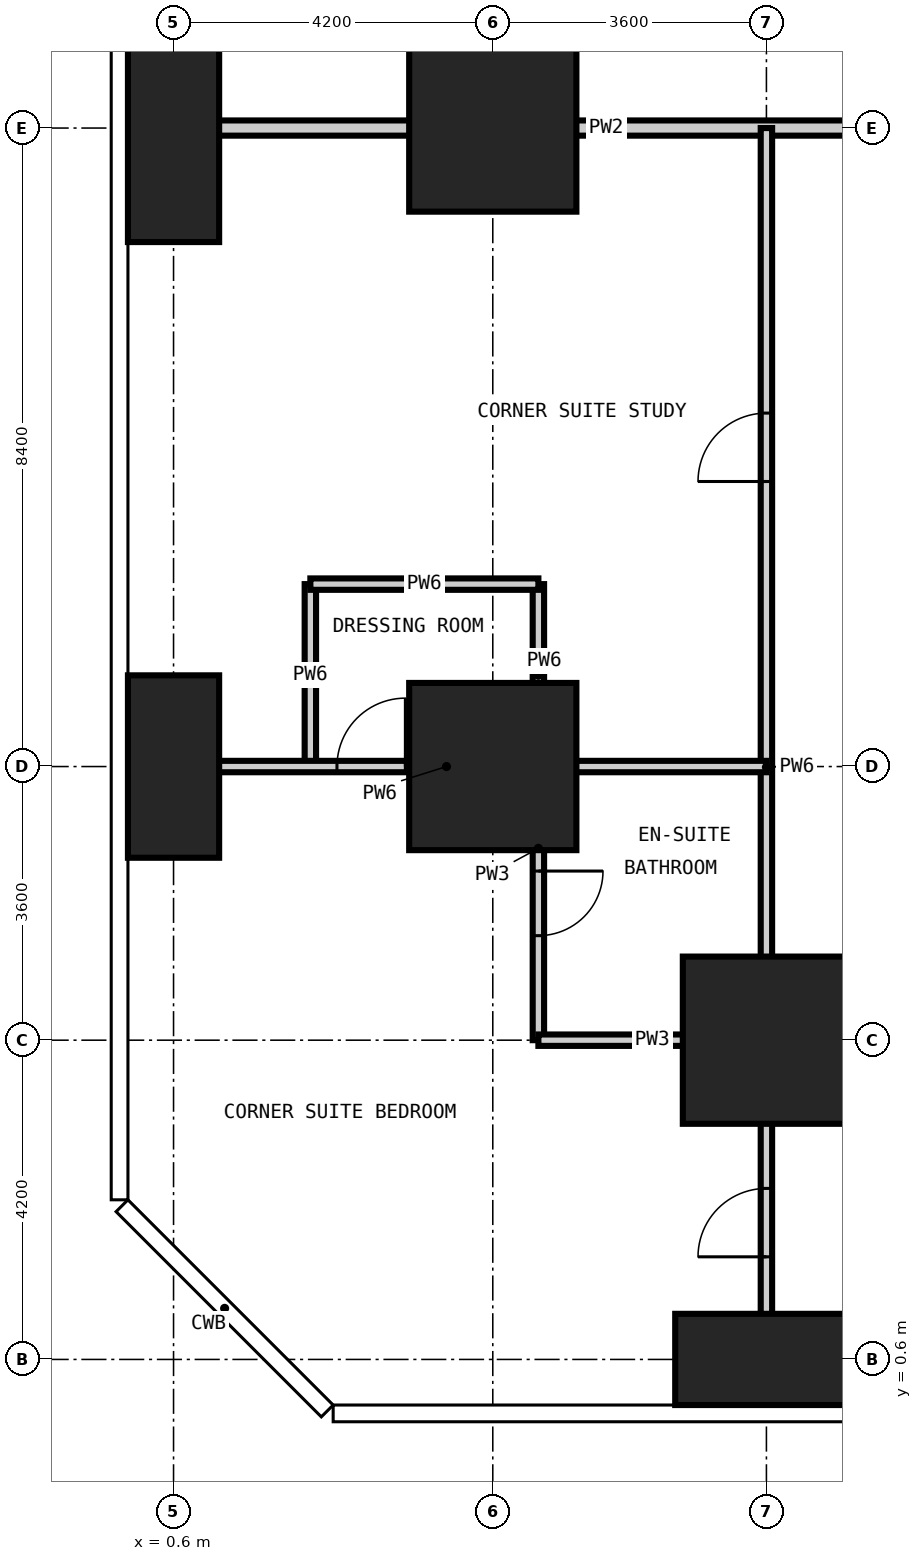
"""IFC4 building model, lengths in metres.
Left out: names, types, materials, properties, quantities, classifications, styles, units other than length and angle.
Written with IfcOpenShell. Run it as: python <this file> out.ifc"""

import sys

from ifc_helpers import new_model, si_unit, direction, frame, frame_2d, origin, origin_2d, place, context, subcontext, project, spatial, rectangle, extrude, element, fill, save


model = new_model("IFC4")
c1 = context("Model", 3, precision=1e-05, world=origin(), true_north=direction((0.0, 1.0)))
c2 = subcontext(c1, "Body", "Model", "MODEL_VIEW")
j1 = project(units=[si_unit("LENGTHUNIT", "METRE"), si_unit("PLANEANGLEUNIT", "RADIAN")], contexts=[c1])
p1 = place(None, origin())
s1 = spatial("IfcSite", under=j1, at=p1, CompositionType="ELEMENT")
p2 = place(p1, origin())
s2 = spatial("IfcBuilding", under=s1, at=p2, CompositionType="ELEMENT")
p3 = place(p2, frame((0.0, 0.0, 93.6)))
s3 = spatial("IfcBuildingStorey", under=s2, at=p3, CompositionType="ELEMENT", Elevation=93.6)
p4 = place(p3, frame((0.6, 8.4, -0.35), z_axis=(0.0, 0.0, 1.0), x_axis=(1.0, 0.0, 0.0)))
e1 = element("IfcColumn", 1, at=p4, inside=s3, PredefinedType="COLUMN", context=c2, shape_type="SweptSolid", body=[
    extrude(rectangle(XDim=1.2, YDim=2.4, at=origin_2d()), origin(), (0.0, 0.0, 1.0), 3.6),
])
p5 = place(p3, frame((0.6, 16.8, -0.35), z_axis=(0.0, 0.0, 1.0), x_axis=(1.0, 0.0, 0.0)))
e2 = element("IfcColumn", 2, at=p5, inside=s3, PredefinedType="COLUMN", context=c2, shape_type="SweptSolid", body=[
    extrude(rectangle(XDim=1.2, YDim=3.0, at=origin_2d()), origin(), (0.0, 0.0, 1.0), 3.6),
])
for number, where, z_axis, x_axis in (
    (3, (4.8, 8.4, -0.35), (0.0, 0.0, 1.0), (1.0, 0.0, 0.0)),
    (4, (4.8, 16.8, -0.35), (0.0, 0.0, 1.0), (1.0, 0.0, 0.0)),
):
    element("IfcColumn", number, at=place(p3, frame(where, z_axis=z_axis, x_axis=x_axis)), inside=s3, PredefinedType="COLUMN", context=c2, shape_type="SweptSolid", body=[
        extrude(rectangle(XDim=2.2, YDim=2.2, at=origin_2d()), origin(), (0.0, 0.0, 1.0), 3.6),
    ])
p6 = place(p3, frame((8.4, 0.6, -0.35), z_axis=(0.0, 0.0, 1.0), x_axis=(1.0, 0.0, 0.0)))
e5 = element("IfcColumn", 5, at=p6, inside=s3, PredefinedType="COLUMN", context=c2, shape_type="SweptSolid", body=[
    extrude(rectangle(XDim=2.4, YDim=1.2, at=origin_2d()), origin(), (0.0, 0.0, 1.0), 3.6),
])
p7 = place(p3, frame((8.4, 4.8, -0.35), z_axis=(0.0, 0.0, 1.0), x_axis=(1.0, 0.0, 0.0)))
e6 = element("IfcColumn", 6, at=p7, inside=s3, PredefinedType="COLUMN", context=c2, shape_type="SweptSolid", body=[
    extrude(rectangle(XDim=2.2, YDim=2.2, at=origin_2d()), origin(), (0.0, 0.0, 1.0), 3.6),
])
p8 = place(p3, frame((5.4, 4.8, 0.0), z_axis=(0.0, 0.0, 1.0), x_axis=(0.0, 1.0, 0.0)))
e7 = element("IfcWall", 7, at=p8, inside=s3, PredefinedType="PARTITIONING", context=c2, shape_type="SweptSolid", body=[
    extrude(rectangle(XDim=3.6, YDim=0.15, at=frame_2d((1.8, 0.0))), origin(), (0.0, 0.0, 1.0), 3.25),
])
p9 = place(p8, frame((1.375, 0.0, 0.0)))
e8 = element("IfcOpeningElement", 8, at=p9, cuts=e7, PredefinedType="OPENING", context=c2, shape_type="SweptSolid", body=[
    extrude(rectangle(XDim=0.85, YDim=2.1, at=frame_2d((0.425, 1.05))), frame((0.0, 0.085, 0.0), z_axis=(0.0, -1.0, 0.0), x_axis=(1.0, 0.0, 0.0)), (0.0, 0.0, 1.0), 0.17),
])
p10 = place(p3, frame((5.4, 4.8, 0.0), z_axis=(0.0, 0.0, 1.0), x_axis=(1.0, 0.0, 0.0)))
e9 = element("IfcWall", 9, at=p10, inside=s3, PredefinedType="PARTITIONING", context=c2, shape_type="SweptSolid", body=[
    extrude(rectangle(XDim=3.0, YDim=0.15, at=frame_2d((1.5, 0.0))), origin(), (0.0, 0.0, 1.0), 3.25),
])
p11 = place(p3, frame((-0.018, 16.8, 0.0), z_axis=(0.0, 0.0, 1.0), x_axis=(1.0, 0.0, 0.0)))
e10 = element("IfcWall", 10, at=p11, inside=s3, PredefinedType="PARTITIONING", context=c2, shape_type="SweptSolid", body=[
    extrude(rectangle(XDim=12.618, YDim=0.2, at=frame_2d((6.309, 0.0))), origin(), (0.0, 0.0, 1.0), 3.25),
])
for number, where, z_axis, x_axis in (
    (11, (2.4, 8.4, 0.0), (0.0, 0.0, 1.0), (0.0, 1.0, 0.0)),
    (12, (5.4, 8.4, 0.0), (0.0, 0.0, 1.0), (0.0, 1.0, 0.0)),
):
    element("IfcWall", number, at=place(p3, frame(where, z_axis=z_axis, x_axis=x_axis)), inside=s3, PredefinedType="PARTITIONING", context=c2, shape_type="SweptSolid", body=[
        extrude(rectangle(XDim=2.4, YDim=0.15, at=frame_2d((1.2, 0.0))), origin(), (0.0, 0.0, 1.0), 3.25),
    ])
p12 = place(p3, frame((8.4, -0.018, 0.0), z_axis=(0.0, 0.0, 1.0), x_axis=(0.0, 1.0, 0.0)))
e13 = element("IfcWall", 13, at=p12, inside=s3, PredefinedType="PARTITIONING", context=c2, shape_type="SweptSolid", body=[
    extrude(rectangle(XDim=16.818, YDim=0.15, at=frame_2d((8.409, 0.0))), origin(), (0.0, 0.0, 1.0), 3.25),
])
p13 = place(p12, frame((1.968, 0.0, 0.0)))
e14 = element("IfcOpeningElement", 14, at=p13, cuts=e13, PredefinedType="OPENING", context=c2, shape_type="SweptSolid", body=[
    extrude(rectangle(XDim=0.9, YDim=2.1, at=frame_2d((0.45, 1.05))), frame((0.0, 0.085, 0.0), z_axis=(0.0, -1.0, 0.0), x_axis=(1.0, 0.0, 0.0)), (0.0, 0.0, 1.0), 0.17),
])
p14 = place(p12, frame((12.168, 0.0, 0.0)))
e15 = element("IfcOpeningElement", 15, at=p14, cuts=e13, PredefinedType="OPENING", context=c2, shape_type="SweptSolid", body=[
    extrude(rectangle(XDim=0.9, YDim=2.1, at=frame_2d((0.45, 1.05))), frame((0.0, 0.085, 0.0), z_axis=(0.0, -1.0, 0.0), x_axis=(1.0, 0.0, 0.0)), (0.0, 0.0, 1.0), 0.17),
])
p15 = place(p3, frame((-0.018, 8.4, 0.0), z_axis=(0.0, 0.0, 1.0), x_axis=(1.0, 0.0, 0.0)))
e16 = element("IfcWall", 16, at=p15, inside=s3, PredefinedType="PARTITIONING", context=c2, shape_type="SweptSolid", body=[
    extrude(rectangle(XDim=8.418, YDim=0.15, at=frame_2d((4.209, 0.0))), origin(), (0.0, 0.0, 1.0), 3.25),
])
p16 = place(p15, frame((2.768, 0.0, 0.0)))
e17 = element("IfcOpeningElement", 17, at=p16, cuts=e16, PredefinedType="OPENING", context=c2, shape_type="SweptSolid", body=[
    extrude(rectangle(XDim=0.9, YDim=2.1, at=frame_2d((0.45, 1.05))), frame((0.0, 0.085, 0.0), z_axis=(0.0, -1.0, 0.0), x_axis=(1.0, 0.0, 0.0)), (0.0, 0.0, 1.0), 0.17),
])
p17 = place(p3, frame((2.4, 10.8, 0.0), z_axis=(0.0, 0.0, 1.0), x_axis=(1.0, 0.0, 0.0)))
e18 = element("IfcWall", 18, at=p17, inside=s3, PredefinedType="PARTITIONING", context=c2, shape_type="SweptSolid", body=[
    extrude(rectangle(XDim=3.0, YDim=0.15, at=frame_2d((1.5, 0.0))), origin(), (0.0, 0.0, 1.0), 3.25),
])
p18 = place(p13, origin())
e19 = element("IfcDoor", 19, at=p18, inside=s3, OperationType="SINGLE_SWING_LEFT", PredefinedType="DOOR", context=c2, shape_type="SweptSolid", body=[
    extrude(rectangle(XDim=0.9, YDim=2.1, at=frame_2d((0.45, 1.05))), frame((0.0, 0.025, 0.0), z_axis=(0.0, -1.0, 0.0), x_axis=(1.0, 0.0, 0.0)), (0.0, 0.0, 1.0), 0.05),
])
fill(e14, e19)
p19 = place(p9, frame((0.85, 0.0, 0.0), z_axis=(0.0, 0.0, 1.0), x_axis=(-1.0, 0.0, 0.0)))
e20 = element("IfcDoor", 20, at=p19, inside=s3, OperationType="SINGLE_SWING_LEFT", PredefinedType="DOOR", context=c2, shape_type="SweptSolid", body=[
    extrude(rectangle(XDim=0.85, YDim=2.1, at=frame_2d((0.425, 1.05))), frame((0.0, 0.025, 0.0), z_axis=(0.0, -1.0, 0.0), x_axis=(1.0, 0.0, 0.0)), (0.0, 0.0, 1.0), 0.05),
])
fill(e8, e20)
p20 = place(p16, origin())
e21 = element("IfcDoor", 21, at=p20, inside=s3, OperationType="SINGLE_SWING_RIGHT", PredefinedType="DOOR", context=c2, shape_type="SweptSolid", body=[
    extrude(rectangle(XDim=0.9, YDim=2.1, at=frame_2d((0.45, 1.05))), frame((0.0, 0.025, 0.0), z_axis=(0.0, -1.0, 0.0), x_axis=(1.0, 0.0, 0.0)), (0.0, 0.0, 1.0), 0.05),
])
fill(e17, e21)
p21 = place(p14, origin())
e22 = element("IfcDoor", 22, at=p21, inside=s3, OperationType="SINGLE_SWING_LEFT", PredefinedType="DOOR", context=c2, shape_type="SweptSolid", body=[
    extrude(rectangle(XDim=0.9, YDim=2.1, at=frame_2d((0.45, 1.05))), frame((0.0, 0.025, 0.0), z_axis=(0.0, -1.0, 0.0), x_axis=(1.0, 0.0, 0.0)), (0.0, 0.0, 1.0), 0.05),
])
fill(e15, e22)
save(model, sys.argv[1])
